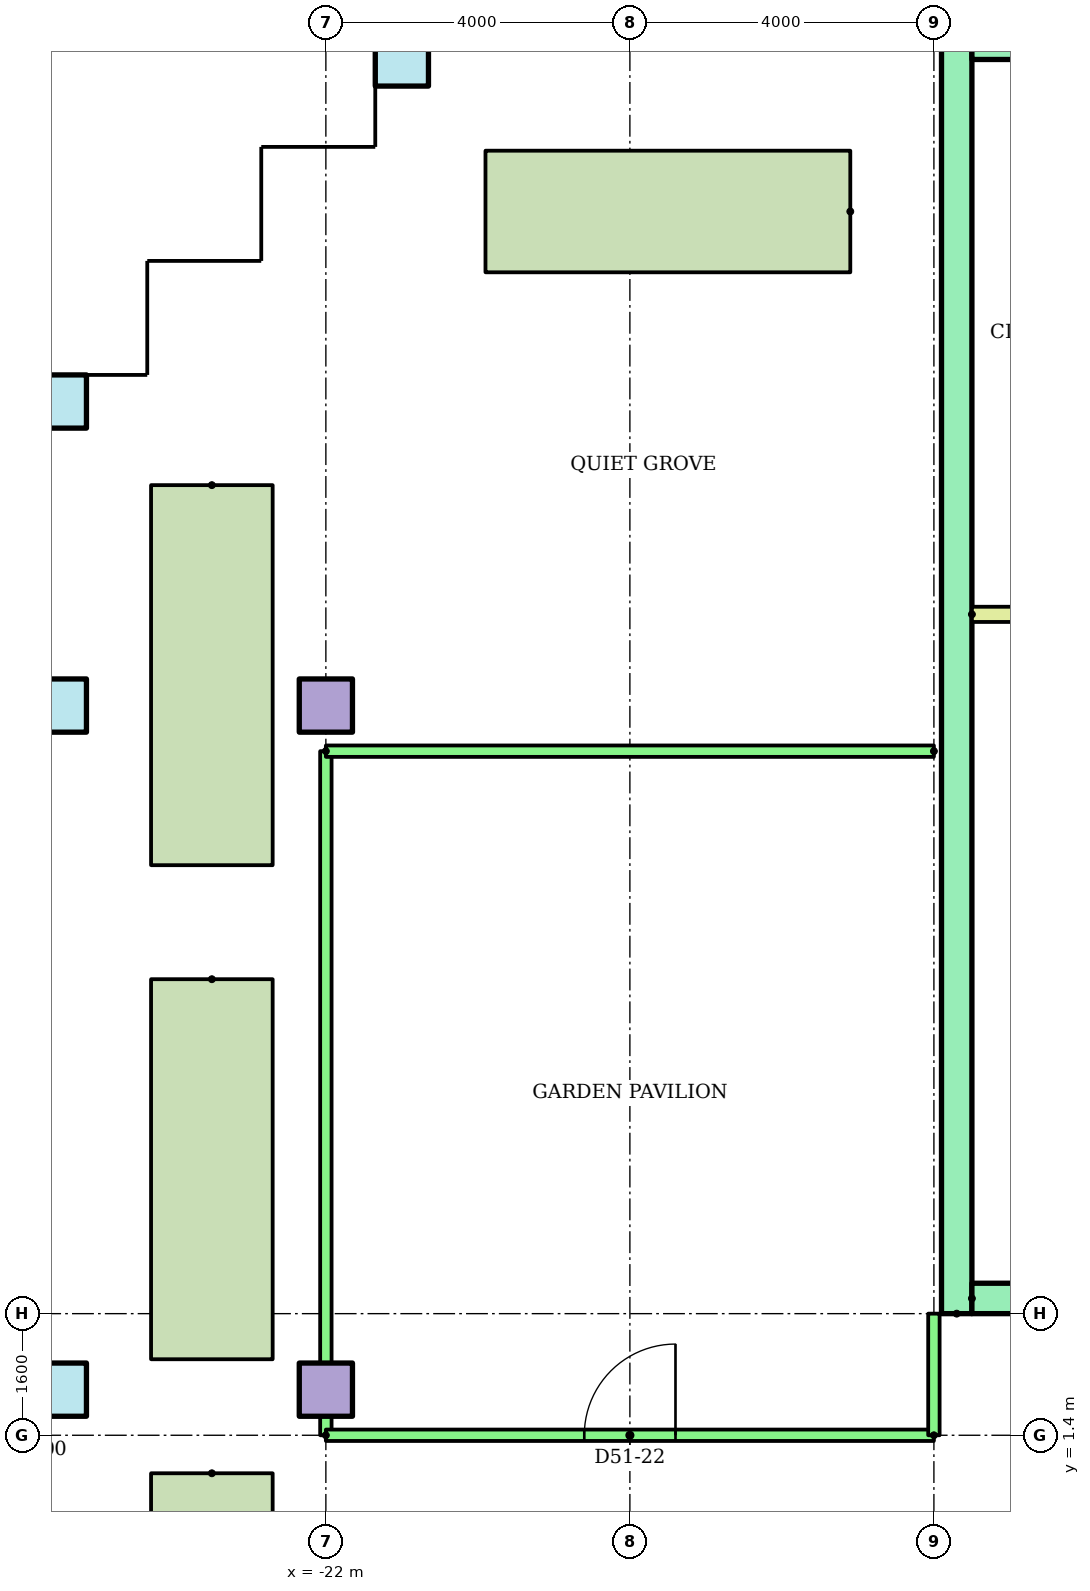
"""IFC4 building model, lengths in metres.
Left out: names, types, materials, properties, quantities, classifications, styles, units other than length and angle.
Written with IfcOpenShell. Run it as: python <this file> out.ifc"""

import sys

from ifc_helpers import new_model, si_unit, direction, frame, frame_2d, origin, origin_2d, place, context, subcontext, project, spatial, rectangle, hollow_rectangle, extrude, element, fill, save


model = new_model("IFC4")
c1 = context("Model", 3, precision=1e-05, world=origin(), true_north=direction((0.0, 1.0)))
c2 = subcontext(c1, "Body", "Model", "MODEL_VIEW")
j1 = project(units=[si_unit("LENGTHUNIT", "METRE"), si_unit("PLANEANGLEUNIT", "RADIAN")], contexts=[c1])
p1 = place(None, origin())
s1 = spatial("IfcSite", under=j1, at=p1, CompositionType="ELEMENT")
p2 = place(p1, origin())
s2 = spatial("IfcBuilding", under=s1, at=p2, CompositionType="ELEMENT")
p3 = place(p2, frame((0.0, 0.0, 194.1)))
s3 = spatial("IfcBuildingStorey", under=s2, at=p3, CompositionType="ELEMENT", Elevation=194.1)
p4 = place(p3, frame((-25.5, 2.0, 0.0)))
e1 = element("IfcColumn", 1, at=p4, inside=s3, PredefinedType="COLUMN", context=c2, shape_type="SweptSolid", body=[
    extrude(hollow_rectangle(XDim=0.7, YDim=0.7, WallThickness=0.036, at=origin_2d()), origin(), (0.0, 0.0, 1.0), 8.8),
])
p5 = place(p3, frame((-22.0, 2.0, 0.0)))
e2 = element("IfcColumn", 2, at=p5, inside=s3, PredefinedType="COLUMN", context=c2, shape_type="SweptSolid", body=[
    extrude(rectangle(XDim=0.7, YDim=0.7, at=origin_2d()), origin(), (0.0, 0.0, 1.0), 9.6),
])
p6 = place(p3, frame((-25.5, 11.0, 0.0)))
e3 = element("IfcColumn", 3, at=p6, inside=s3, PredefinedType="COLUMN", context=c2, shape_type="SweptSolid", body=[
    extrude(hollow_rectangle(XDim=0.7, YDim=0.7, WallThickness=0.036, at=origin_2d()), origin(), (0.0, 0.0, 1.0), 8.8),
])
p7 = place(p3, frame((-22.0, 11.0, 0.0)))
e4 = element("IfcColumn", 4, at=p7, inside=s3, PredefinedType="COLUMN", context=c2, shape_type="SweptSolid", body=[
    extrude(rectangle(XDim=0.7, YDim=0.7, at=origin_2d()), origin(), (0.0, 0.0, 1.0), 9.6),
])
for number, where in (
    (5, (-25.5, 15.0, 0.0)),
    (6, (-21.0, 19.5, 0.0)),
):
    element("IfcColumn", number, at=place(p3, frame(where)), inside=s3, PredefinedType="COLUMN", context=c2, shape_type="SweptSolid", body=[
        extrude(hollow_rectangle(XDim=0.7, YDim=0.7, WallThickness=0.036, at=origin_2d()), origin(), (0.0, 0.0, 1.0), 8.8),
    ])
p8 = place(p3, frame((-15.1, 17.5, 0.0), z_axis=(0.0, 0.0, 1.0), x_axis=(-1.0, 0.0, 0.0)))
e7 = element("IfcWall", 7, at=p8, inside=s3, PredefinedType="STANDARD", context=c2, shape_type="SweptSolid", body=[
    extrude(rectangle(XDim=4.8, YDim=1.6, at=frame_2d((2.4, 0.0))), origin(), (0.0, 0.0, 1.0), 0.8),
])
for number, where, z_axis, x_axis in (
    (8, (-23.5, 13.9, 0.0), (0.0, 0.0, 1.0), (0.0, -1.0, 0.0)),
    (9, (-23.5, 7.4, 0.0), (0.0, 0.0, 1.0), (0.0, -1.0, 0.0)),
):
    element("IfcWall", number, at=place(p3, frame(where, z_axis=z_axis, x_axis=x_axis)), inside=s3, PredefinedType="STANDARD", context=c2, shape_type="SweptSolid", body=[
        extrude(rectangle(XDim=5.0, YDim=1.6, at=frame_2d((2.5, 0.0))), origin(), (0.0, 0.0, 1.0), 0.8),
    ])
p9 = place(p3, frame((-13.7, 3.0, 0.0), z_axis=(0.0, 0.0, 1.0), x_axis=(0.0, 1.0, 0.0)))
e10 = element("IfcWall", 10, at=p9, inside=s3, PredefinedType="SHEAR", context=c2, shape_type="SweptSolid", body=[
    extrude(rectangle(XDim=17.0, YDim=0.4, at=frame_2d((8.5, 0.0))), origin(), (0.0, 0.0, 1.0), 8.8),
])
p10 = place(p3, frame((-13.5, 19.7, 0.0)))
e11 = element("IfcWall", 11, at=p10, inside=s3, PredefinedType="SHEAR", context=c2, shape_type="SweptSolid", body=[
    extrude(rectangle(XDim=27.0, YDim=0.4, at=frame_2d((13.5, 0.0))), origin(), (0.0, 0.0, 1.0), 8.8),
])
p11 = place(p3, frame((-13.5, 3.2, 0.0)))
e12 = element("IfcWall", 12, at=p11, inside=s3, PredefinedType="SHEAR", context=c2, shape_type="SweptSolid", body=[
    extrude(rectangle(XDim=27.0, YDim=0.4, at=frame_2d((13.5, 0.0))), origin(), (0.0, 0.0, 1.0), 8.8),
])
p12 = place(p11, frame((22.083, 0.0, 0.0)))
e13 = element("IfcOpeningElement", 13, at=p12, cuts=e12, PredefinedType="OPENING", context=c2, shape_type="SweptSolid", body=[
    extrude(rectangle(XDim=1.1, YDim=2.1, at=frame_2d((0.55, 1.05))), frame((0.0, 0.21, 0.0), z_axis=(0.0, -1.0, 0.0), x_axis=(1.0, 0.0, 0.0)), (0.0, 0.0, 1.0), 0.42),
])
p13 = place(p11, frame((25.128, 0.0, 0.0)))
e14 = element("IfcOpeningElement", 14, at=p13, cuts=e12, PredefinedType="OPENING", context=c2, shape_type="SweptSolid", body=[
    extrude(rectangle(XDim=1.1, YDim=2.1, at=frame_2d((0.55, 1.05))), frame((0.0, 0.21, 0.0), z_axis=(0.0, -1.0, 0.0), x_axis=(1.0, 0.0, 0.0)), (0.0, 0.0, 1.0), 0.42),
])
p14 = place(p11, frame((12.6, 0.0, 0.0)))
e15 = element("IfcOpeningElement", 15, at=p14, cuts=e12, PredefinedType="OPENING", context=c2, shape_type="SweptSolid", body=[
    extrude(rectangle(XDim=1.8, YDim=2.1, at=frame_2d((0.9, 1.05))), frame((0.0, 0.21, 0.0), z_axis=(0.0, -1.0, 0.0), x_axis=(1.0, 0.0, 0.0)), (0.0, 0.0, 1.0), 0.42),
])
p15 = place(p3, frame((-13.5, 12.2, 0.0)))
e16 = element("IfcWall", 16, at=p15, inside=s3, PredefinedType="PARTITIONING", context=c2, shape_type="SweptSolid", body=[
    extrude(rectangle(XDim=3.9, YDim=0.2, at=frame_2d((1.95, 0.0))), origin(), (0.0, 0.0, 1.0), 8.8),
])
p16 = place(p3, frame((-22.0, 10.4, 0.0), z_axis=(0.0, 0.0, 1.0), x_axis=(0.0, -1.0, 0.0)))
e17 = element("IfcWall", 17, at=p16, inside=s3, PredefinedType="PARTITIONING", context=c2, shape_type="SweptSolid", body=[
    extrude(rectangle(XDim=9.0, YDim=0.15, at=frame_2d((4.5, 0.0))), origin(), (0.0, 0.0, 1.0), 8.8),
])
p17 = place(p3, frame((-14.0, 10.4, 0.0), z_axis=(0.0, 0.0, 1.0), x_axis=(-1.0, 0.0, 0.0)))
e18 = element("IfcWall", 18, at=p17, inside=s3, PredefinedType="PARTITIONING", context=c2, shape_type="SweptSolid", body=[
    extrude(rectangle(XDim=8.0, YDim=0.15, at=frame_2d((4.0, 0.0))), origin(), (0.0, 0.0, 1.0), 8.8),
])
p18 = place(p3, frame((-22.0, 1.4, 0.0)))
e19 = element("IfcWall", 19, at=p18, inside=s3, PredefinedType="PARTITIONING", context=c2, shape_type="SweptSolid", body=[
    extrude(rectangle(XDim=8.0, YDim=0.15, at=frame_2d((4.0, 0.0))), origin(), (0.0, 0.0, 1.0), 8.8),
])
p19 = place(p18, frame((3.4, 0.0, 0.0)))
e20 = element("IfcOpeningElement", 20, at=p19, cuts=e19, PredefinedType="OPENING", context=c2, shape_type="SweptSolid", body=[
    extrude(rectangle(XDim=1.2, YDim=2.1, at=frame_2d((0.6, 1.05))), frame((0.0, 0.085, 0.0), z_axis=(0.0, -1.0, 0.0), x_axis=(1.0, 0.0, 0.0)), (0.0, 0.0, 1.0), 0.17),
])
p20 = place(p3, frame((-14.0, 1.4, 0.0), z_axis=(0.0, 0.0, 1.0), x_axis=(0.0, 1.0, 0.0)))
e21 = element("IfcWall", 21, at=p20, inside=s3, PredefinedType="PARTITIONING", context=c2, shape_type="SweptSolid", body=[
    extrude(rectangle(XDim=1.6, YDim=0.15, at=frame_2d((0.8, 0.0))), origin(), (0.0, 0.0, 1.0), 8.8),
])
p21 = place(p3, frame((-23.5, 0.9, 0.0), z_axis=(0.0, 0.0, 1.0), x_axis=(0.0, -1.0, 0.0)))
e22 = element("IfcWall", 22, at=p21, inside=s3, PredefinedType="STANDARD", context=c2, shape_type="SweptSolid", body=[
    extrude(rectangle(XDim=1.45, YDim=1.6, at=frame_2d((0.725, 0.0))), origin(), (0.0, 0.0, 1.0), 0.8),
])
p22 = place(p19, origin())
e23 = element("IfcDoor", 23, at=p22, inside=s3, OperationType="SINGLE_SWING_RIGHT", PredefinedType="DOOR", context=c2, shape_type="SweptSolid", body=[
    extrude(rectangle(XDim=1.2, YDim=2.1, at=frame_2d((0.6, 1.05))), frame((0.0, 0.025, 0.0), z_axis=(0.0, -1.0, 0.0), x_axis=(1.0, 0.0, 0.0)), (0.0, 0.0, 1.0), 0.05),
])
fill(e20, e23)
save(model, sys.argv[1])
